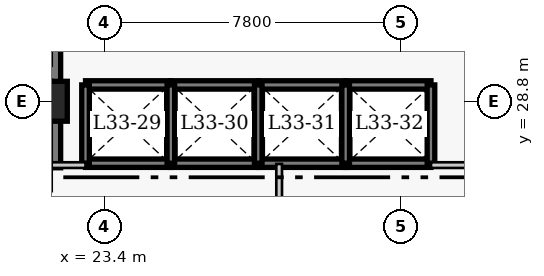
"""IFC4 building model, lengths in metres.
Left out: names, types, materials, properties, quantities, classifications, styles, units other than length and angle.
Written with IfcOpenShell. Run it as: python <this file> out.ifc"""

import sys

from ifc_helpers import new_model, si_unit, direction, frame, frame_2d, origin, origin_2d, place, context, subcontext, project, spatial, rectangle, extrude, element, save


model = new_model("IFC4")
c1 = context("Model", 3, precision=1e-05, world=origin(), true_north=direction((0.0, 1.0)))
c2 = subcontext(c1, "Body", "Model", "MODEL_VIEW")
j1 = project(units=[si_unit("LENGTHUNIT", "METRE"), si_unit("PLANEANGLEUNIT", "RADIAN")], contexts=[c1])
p1 = place(None, origin())
s1 = spatial("IfcSite", under=j1, at=p1, CompositionType="ELEMENT")
p2 = place(p1, origin())
s2 = spatial("IfcBuilding", under=s1, at=p2, CompositionType="ELEMENT")
p3 = place(p2, frame((0.0, 0.0, 134.6)))
s3 = spatial("IfcBuildingStorey", under=s2, at=p3, CompositionType="ELEMENT", Elevation=134.6)
p4 = place(p3, frame((21.9, 27.05, 0.0), z_axis=(0.0, 0.0, 1.0), x_axis=(0.0, 1.0, 0.0)))
e1 = element("IfcWall", 1, at=p4, inside=s3, PredefinedType="SHEAR", context=c2, shape_type="SweptSolid", body=[
    extrude(rectangle(XDim=13.62, YDim=0.7, at=frame_2d((6.81, 0.0))), origin(), (0.0, 0.0, 1.0), 3.8),
])
p5 = place(p3, frame((21.9, 28.8, 0.0), z_axis=(0.0, 0.0, 1.0), x_axis=(1.0, 0.0, 0.0)))
e2 = element("IfcColumn", 2, at=p5, inside=s3, PredefinedType="COLUMN", context=c2, shape_type="SweptSolid", body=[
    extrude(rectangle(XDim=1.05, YDim=1.05, at=origin_2d()), origin(), (0.0, 0.0, 1.0), 3.8),
])
for number, where, z_axis, x_axis in (
    (3, (22.905, 29.23, 0.0), (0.0, 0.0, 1.0), (1.0, 0.0, 0.0)),
    (4, (22.905, 27.17, 0.0), (0.0, 0.0, 1.0), (1.0, 0.0, 0.0)),
):
    element("IfcWall", number, at=place(p3, frame(where, z_axis=z_axis, x_axis=x_axis)), inside=s3, PredefinedType="SHEAR", context=c2, shape_type="SweptSolid", body=[
        extrude(rectangle(XDim=2.245, YDim=0.22, at=frame_2d((1.123, 0.0))), origin(), (0.0, 0.0, 1.0), 3.8),
    ])
p6 = place(p3, frame((22.905, 27.17, 0.0), z_axis=(0.0, 0.0, 1.0), x_axis=(0.0, 1.0, 0.0)))
e5 = element("IfcWall", 5, at=p6, inside=s3, PredefinedType="SHEAR", context=c2, shape_type="SweptSolid", body=[
    extrude(rectangle(XDim=2.06, YDim=0.2, at=frame_2d((1.03, 0.0))), origin(), (0.0, 0.0, 1.0), 3.8),
])
for number, where, z_axis, x_axis in (
    (6, (25.15, 29.23, 0.0), (0.0, 0.0, 1.0), (1.0, 0.0, 0.0)),
    (7, (25.15, 27.17, 0.0), (0.0, 0.0, 1.0), (1.0, 0.0, 0.0)),
):
    element("IfcWall", number, at=place(p3, frame(where, z_axis=z_axis, x_axis=x_axis)), inside=s3, PredefinedType="SHEAR", context=c2, shape_type="SweptSolid", body=[
        extrude(rectangle(XDim=2.3, YDim=0.22, at=frame_2d((1.15, 0.0))), origin(), (0.0, 0.0, 1.0), 3.8),
    ])
p7 = place(p3, frame((25.15, 27.17, 0.0), z_axis=(0.0, 0.0, 1.0), x_axis=(0.0, 1.0, 0.0)))
e8 = element("IfcWall", 8, at=p7, inside=s3, PredefinedType="SHEAR", context=c2, shape_type="SweptSolid", body=[
    extrude(rectangle(XDim=2.06, YDim=0.2, at=frame_2d((1.03, 0.0))), origin(), (0.0, 0.0, 1.0), 3.8),
])
for number, where, z_axis, x_axis in (
    (9, (27.45, 29.23, 0.0), (0.0, 0.0, 1.0), (1.0, 0.0, 0.0)),
    (10, (27.45, 27.17, 0.0), (0.0, 0.0, 1.0), (1.0, 0.0, 0.0)),
):
    element("IfcWall", number, at=place(p3, frame(where, z_axis=z_axis, x_axis=x_axis)), inside=s3, PredefinedType="SHEAR", context=c2, shape_type="SweptSolid", body=[
        extrude(rectangle(XDim=2.3, YDim=0.22, at=frame_2d((1.15, 0.0))), origin(), (0.0, 0.0, 1.0), 3.8),
    ])
p8 = place(p3, frame((27.45, 27.17, 0.0), z_axis=(0.0, 0.0, 1.0), x_axis=(0.0, 1.0, 0.0)))
e11 = element("IfcWall", 11, at=p8, inside=s3, PredefinedType="SHEAR", context=c2, shape_type="SweptSolid", body=[
    extrude(rectangle(XDim=2.06, YDim=0.2, at=frame_2d((1.03, 0.0))), origin(), (0.0, 0.0, 1.0), 3.8),
])
for number, where, z_axis, x_axis in (
    (12, (29.75, 29.23, 0.0), (0.0, 0.0, 1.0), (1.0, 0.0, 0.0)),
    (13, (29.75, 27.17, 0.0), (0.0, 0.0, 1.0), (1.0, 0.0, 0.0)),
):
    element("IfcWall", number, at=place(p3, frame(where, z_axis=z_axis, x_axis=x_axis)), inside=s3, PredefinedType="SHEAR", context=c2, shape_type="SweptSolid", body=[
        extrude(rectangle(XDim=2.245, YDim=0.22, at=frame_2d((1.123, 0.0))), origin(), (0.0, 0.0, 1.0), 3.8),
    ])
for number, where, z_axis, x_axis in (
    (14, (29.75, 27.17, 0.0), (0.0, 0.0, 1.0), (0.0, 1.0, 0.0)),
    (15, (31.995, 27.17, 0.0), (0.0, 0.0, 1.0), (0.0, 1.0, 0.0)),
):
    element("IfcWall", number, at=place(p3, frame(where, z_axis=z_axis, x_axis=x_axis)), inside=s3, PredefinedType="SHEAR", context=c2, shape_type="SweptSolid", body=[
        extrude(rectangle(XDim=2.06, YDim=0.2, at=frame_2d((1.03, 0.0))), origin(), (0.0, 0.0, 1.0), 3.8),
    ])
p9 = place(p3, frame((28.0, 16.66, 0.0), z_axis=(0.0, 0.0, 1.0), x_axis=(0.0, 1.0, 0.0)))
e16 = element("IfcWall", 16, at=p9, inside=s3, PredefinedType="PARTITIONING", context=c2, shape_type="SweptSolid", body=[
    extrude(rectangle(XDim=10.49, YDim=0.15, at=frame_2d((5.245, 0.0))), origin(), (0.0, 0.0, 1.0), 3.55),
])
p10 = place(p3, frame((20.46, 27.12, 0.0), z_axis=(0.0, 0.0, 1.0), x_axis=(1.0, 0.0, 0.0)))
e17 = element("IfcWall", 17, at=p10, inside=s3, PredefinedType="PARTITIONING", context=c2, shape_type="SweptSolid", body=[
    extrude(rectangle(XDim=2.445, YDim=0.15, at=frame_2d((1.223, 0.0))), origin(), (0.0, 0.0, 1.0), 3.55),
])
p11 = place(p3, frame((31.995, 27.12, 0.0), z_axis=(0.0, 0.0, 1.0), x_axis=(1.0, 0.0, 0.0)))
e18 = element("IfcWall", 18, at=p11, inside=s3, PredefinedType="PARTITIONING", context=c2, shape_type="SweptSolid", body=[
    extrude(rectangle(XDim=1.655, YDim=0.15, at=frame_2d((0.827, 0.0))), origin(), (0.0, 0.0, 1.0), 3.55),
])
save(model, sys.argv[1])
